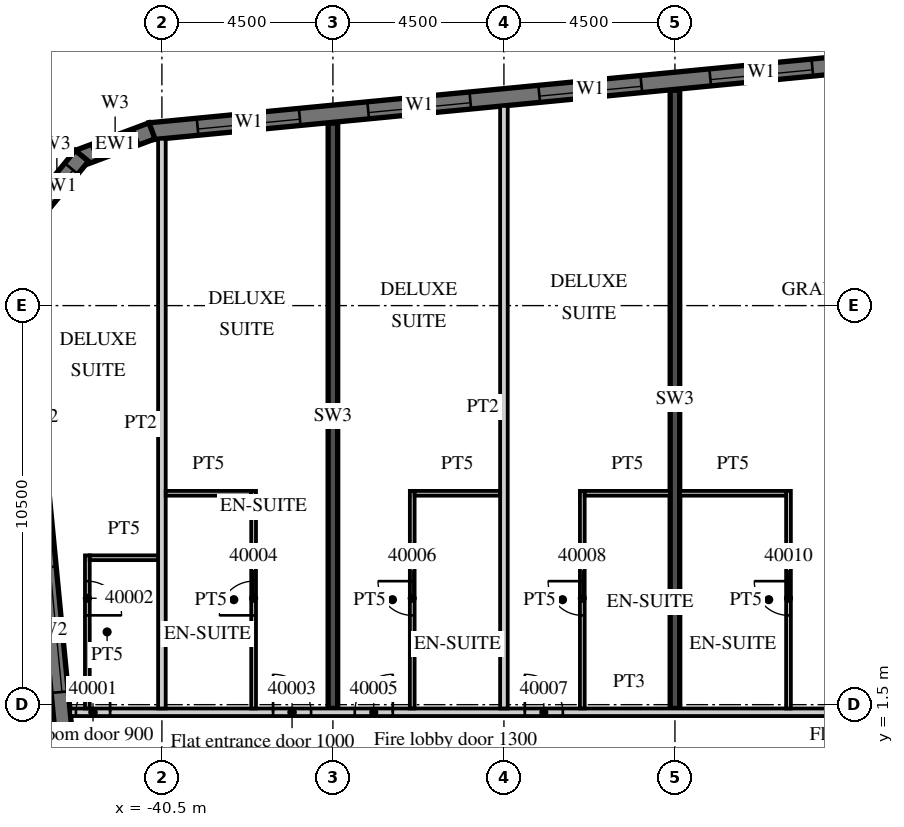
"""IFC4 building model, lengths in metres.
Left out: names, types, materials, properties, quantities, classifications, styles, units other than length and angle.
Written with IfcOpenShell. Run it as: python <this file> out.ifc"""

import sys

from ifc_helpers import new_model, si_unit, direction, frame, frame_2d, origin, place, context, subcontext, project, spatial, polyline, rectangle, outline, extrude, element, fill, save


model = new_model("IFC4")
c1 = context("Model", 3, precision=1e-05, world=origin(), true_north=direction((0.0, 1.0)))
c2 = subcontext(c1, "Body", "Model", "MODEL_VIEW")
j1 = project(units=[si_unit("LENGTHUNIT", "METRE"), si_unit("PLANEANGLEUNIT", "RADIAN")], contexts=[c1])
p1 = place(None, origin())
s1 = spatial("IfcSite", under=j1, at=p1, CompositionType="ELEMENT")
p2 = place(p1, origin())
s2 = spatial("IfcBuilding", under=s1, at=p2, CompositionType="ELEMENT")
p3 = place(p2, frame((0.0, 0.0, 173.5)))
s3 = spatial("IfcBuildingStorey", under=s2, at=p3, CompositionType="ELEMENT", Elevation=173.5)
p4 = place(p3, frame((-36.0, 1.4, 0.0), z_axis=(0.0, 0.0, 1.0), x_axis=(0.0, 1.0, 0.0)))
e1 = element("IfcWall", 1, at=p4, inside=s3, PredefinedType="SHEAR", context=c2, shape_type="SweptSolid", body=[
    extrude(rectangle(XDim=15.401, YDim=0.25, at=frame_2d((7.701, 0.0))), origin(), (0.0, 0.0, 1.0), 3.3),
])
p5 = place(p3, frame((-27.0, 1.4, 0.0), z_axis=(0.0, 0.0, 1.0), x_axis=(0.0, 1.0, 0.0)))
e2 = element("IfcWall", 2, at=p5, inside=s3, PredefinedType="SHEAR", context=c2, shape_type="SweptSolid", body=[
    extrude(rectangle(XDim=16.268, YDim=0.25, at=frame_2d((8.134, 0.0))), origin(), (0.0, 0.0, 1.0), 3.3),
])
p6 = place(p3, frame((-44.214, 12.466, 0.0), z_axis=(0.0, 0.0, 1.0), x_axis=(0.095847314626, -0.995396047952, 0.0)))
e3 = element("IfcWall", 3, at=p6, inside=s3, PredefinedType="SOLIDWALL", context=c2, shape_type="SweptSolid", body=[
    extrude(rectangle(XDim=34.0, YDim=0.45, at=frame_2d((17.0, 0.0))), origin(), (0.0, 0.0, 1.0), 3.02),
])
p7 = place(p6, frame((2.865, 0.0, 0.45)))
e4 = element("IfcOpeningElement", 4, at=p7, cuts=e3, PredefinedType="OPENING", context=c2, shape_type="SweptSolid", body=[
    extrude(rectangle(XDim=3.3, YDim=2.25, at=frame_2d((1.65, 1.125))), frame((0.0, 0.235, 0.0), z_axis=(0.0, -1.0, 0.0), x_axis=(1.0, 0.0, 0.0)), (0.0, 0.0, 1.0), 0.47),
])
p8 = place(p6, frame((7.386, 0.0, 0.45)))
e5 = element("IfcOpeningElement", 5, at=p8, cuts=e3, PredefinedType="OPENING", context=c2, shape_type="SweptSolid", body=[
    extrude(rectangle(XDim=3.3, YDim=2.25, at=frame_2d((1.65, 1.125))), frame((0.0, 0.235, 0.0), z_axis=(0.0, -1.0, 0.0), x_axis=(1.0, 0.0, 0.0)), (0.0, 0.0, 1.0), 0.47),
])
p9 = place(p3, frame((13.521, 21.817, 0.0), z_axis=(0.0, 0.0, 1.0), x_axis=(-0.995396508751, -0.095842529008, 0.0)))
e6 = element("IfcWall", 6, at=p9, inside=s3, PredefinedType="SOLIDWALL", context=c2, shape_type="SweptSolid", body=[
    extrude(rectangle(XDim=54.591, YDim=0.45, at=frame_2d((27.296, 0.0))), origin(), (0.0, 0.0, 1.0), 3.02),
])
p10 = place(p9, frame((0.91, 0.0, 0.45)))
e7 = element("IfcOpeningElement", 7, at=p10, cuts=e6, PredefinedType="OPENING", context=c2, shape_type="SweptSolid", body=[
    extrude(rectangle(XDim=2.7, YDim=2.25, at=frame_2d((1.35, 1.125))), frame((0.0, 0.235, 0.0), z_axis=(0.0, -1.0, 0.0), x_axis=(1.0, 0.0, 0.0)), (0.0, 0.0, 1.0), 0.47),
])
p11 = place(p9, frame((5.431, 0.0, 0.45)))
e8 = element("IfcOpeningElement", 8, at=p11, cuts=e6, PredefinedType="OPENING", context=c2, shape_type="SweptSolid", body=[
    extrude(rectangle(XDim=2.7, YDim=2.25, at=frame_2d((1.35, 1.125))), frame((0.0, 0.235, 0.0), z_axis=(0.0, -1.0, 0.0), x_axis=(1.0, 0.0, 0.0)), (0.0, 0.0, 1.0), 0.47),
])
p12 = place(p9, frame((9.952, 0.0, 0.45)))
e9 = element("IfcOpeningElement", 9, at=p12, cuts=e6, PredefinedType="OPENING", context=c2, shape_type="SweptSolid", body=[
    extrude(rectangle(XDim=2.7, YDim=2.25, at=frame_2d((1.35, 1.125))), frame((0.0, 0.235, 0.0), z_axis=(0.0, -1.0, 0.0), x_axis=(1.0, 0.0, 0.0)), (0.0, 0.0, 1.0), 0.47),
])
p13 = place(p9, frame((14.473, 0.0, 0.45)))
e10 = element("IfcOpeningElement", 10, at=p13, cuts=e6, PredefinedType="OPENING", context=c2, shape_type="SweptSolid", body=[
    extrude(rectangle(XDim=2.7, YDim=2.25, at=frame_2d((1.35, 1.125))), frame((0.0, 0.235, 0.0), z_axis=(0.0, -1.0, 0.0), x_axis=(1.0, 0.0, 0.0)), (0.0, 0.0, 1.0), 0.47),
])
p14 = place(p9, frame((18.994, 0.0, 0.45)))
e11 = element("IfcOpeningElement", 11, at=p14, cuts=e6, PredefinedType="OPENING", context=c2, shape_type="SweptSolid", body=[
    extrude(rectangle(XDim=2.7, YDim=2.25, at=frame_2d((1.35, 1.125))), frame((0.0, 0.235, 0.0), z_axis=(0.0, -1.0, 0.0), x_axis=(1.0, 0.0, 0.0)), (0.0, 0.0, 1.0), 0.47),
])
p15 = place(p9, frame((23.514, 0.0, 0.45)))
e12 = element("IfcOpeningElement", 12, at=p15, cuts=e6, PredefinedType="OPENING", context=c2, shape_type="SweptSolid", body=[
    extrude(rectangle(XDim=2.7, YDim=2.25, at=frame_2d((1.35, 1.125))), frame((0.0, 0.235, 0.0), z_axis=(0.0, -1.0, 0.0), x_axis=(1.0, 0.0, 0.0)), (0.0, 0.0, 1.0), 0.47),
])
p16 = place(p9, frame((28.035, 0.0, 0.45)))
e13 = element("IfcOpeningElement", 13, at=p16, cuts=e6, PredefinedType="OPENING", context=c2, shape_type="SweptSolid", body=[
    extrude(rectangle(XDim=2.7, YDim=2.25, at=frame_2d((1.35, 1.125))), frame((0.0, 0.235, 0.0), z_axis=(0.0, -1.0, 0.0), x_axis=(1.0, 0.0, 0.0)), (0.0, 0.0, 1.0), 0.47),
])
p17 = place(p9, frame((32.556, 0.0, 0.45)))
e14 = element("IfcOpeningElement", 14, at=p17, cuts=e6, PredefinedType="OPENING", context=c2, shape_type="SweptSolid", body=[
    extrude(rectangle(XDim=2.7, YDim=2.25, at=frame_2d((1.35, 1.125))), frame((0.0, 0.235, 0.0), z_axis=(0.0, -1.0, 0.0), x_axis=(1.0, 0.0, 0.0)), (0.0, 0.0, 1.0), 0.47),
])
p18 = place(p9, frame((37.077, 0.0, 0.45)))
e15 = element("IfcOpeningElement", 15, at=p18, cuts=e6, PredefinedType="OPENING", context=c2, shape_type="SweptSolid", body=[
    extrude(rectangle(XDim=2.7, YDim=2.25, at=frame_2d((1.35, 1.125))), frame((0.0, 0.235, 0.0), z_axis=(0.0, -1.0, 0.0), x_axis=(1.0, 0.0, 0.0)), (0.0, 0.0, 1.0), 0.47),
])
p19 = place(p9, frame((41.598, 0.0, 0.45)))
e16 = element("IfcOpeningElement", 16, at=p19, cuts=e6, PredefinedType="OPENING", context=c2, shape_type="SweptSolid", body=[
    extrude(rectangle(XDim=2.7, YDim=2.25, at=frame_2d((1.35, 1.125))), frame((0.0, 0.235, 0.0), z_axis=(0.0, -1.0, 0.0), x_axis=(1.0, 0.0, 0.0)), (0.0, 0.0, 1.0), 0.47),
])
p20 = place(p9, frame((46.118, 0.0, 0.45)))
e17 = element("IfcOpeningElement", 17, at=p20, cuts=e6, PredefinedType="OPENING", context=c2, shape_type="SweptSolid", body=[
    extrude(rectangle(XDim=2.7, YDim=2.25, at=frame_2d((1.35, 1.125))), frame((0.0, 0.235, 0.0), z_axis=(0.0, -1.0, 0.0), x_axis=(1.0, 0.0, 0.0)), (0.0, 0.0, 1.0), 0.47),
])
p21 = place(p9, frame((50.629, 0.0, 0.45)))
e18 = element("IfcOpeningElement", 18, at=p21, cuts=e6, PredefinedType="OPENING", context=c2, shape_type="SweptSolid", body=[
    extrude(rectangle(XDim=2.7, YDim=2.25, at=frame_2d((1.35, 1.125))), frame((0.0, 0.235, 0.0), z_axis=(0.0, -1.0, 0.0), x_axis=(1.0, 0.0, 0.0)), (0.0, 0.0, 1.0), 0.47),
])
p22 = place(p3, frame((-40.761, 16.598, 0.0), z_axis=(0.0, 0.0, 1.0), x_axis=(-0.936677599948, -0.350192909346, 0.0)))
e19 = element("IfcWall", 19, at=p22, inside=s3, PredefinedType="SOLIDWALL", context=c2, shape_type="SweptSolid", body=[
    extrude(outline(polyline([(0.0, -0.225), (2.071, -0.225), (1.95, 0.225), (0.121, 0.225), (0.0, -0.225)])), origin(), (0.0, 0.0, 1.0), 3.02),
])
p23 = place(p22, frame((0.435, 0.0, 0.45)))
e20 = element("IfcOpeningElement", 20, at=p23, cuts=e19, PredefinedType="OPENING", context=c2, shape_type="SweptSolid", body=[
    extrude(rectangle(XDim=1.2, YDim=2.25, at=frame_2d((0.6, 1.125))), frame((0.0, 0.235, 0.0), z_axis=(0.0, -1.0, 0.0), x_axis=(1.0, 0.0, 0.0)), (0.0, 0.0, 1.0), 0.47),
])
p24 = place(p3, frame((-42.606, 15.941, 0.0), z_axis=(0.0, 0.0, 1.0), x_axis=(-0.636116318187, -0.771593176315, 0.0)))
e21 = element("IfcWall", 21, at=p24, inside=s3, PredefinedType="SOLIDWALL", context=c2, shape_type="SweptSolid", body=[
    extrude(outline(polyline([(0.0, -0.225), (2.071, -0.225), (1.95, 0.225), (0.121, 0.225), (0.0, -0.225)])), origin(), (0.0, 0.0, 1.0), 3.02),
])
p25 = place(p24, frame((0.435, 0.0, 0.45)))
e22 = element("IfcOpeningElement", 22, at=p25, cuts=e21, PredefinedType="OPENING", context=c2, shape_type="SweptSolid", body=[
    extrude(rectangle(XDim=1.2, YDim=2.25, at=frame_2d((0.6, 1.125))), frame((0.0, 0.235, 0.0), z_axis=(0.0, -1.0, 0.0), x_axis=(1.0, 0.0, 0.0)), (0.0, 0.0, 1.0), 0.47),
])
p26 = place(p3, frame((-42.913, 1.3, 0.0), z_axis=(0.0, 0.0, 1.0), x_axis=(1.0, 0.0, 0.0)))
e23 = element("IfcWall", 23, at=p26, inside=s3, PredefinedType="PARTITIONING", context=c2, shape_type="SweptSolid", body=[
    extrude(rectangle(XDim=29.413, YDim=0.2, at=frame_2d((14.707, 0.0))), origin(), (0.0, 0.0, 1.0), 3.02),
])
p27 = place(p26, frame((0.15, 0.0, 0.0)))
e24 = element("IfcOpeningElement", 24, at=p27, cuts=e23, PredefinedType="OPENING", context=c2, shape_type="SweptSolid", body=[
    extrude(rectangle(XDim=0.9, YDim=2.1, at=frame_2d((0.45, 1.05))), frame((0.0, 0.11, 0.0), z_axis=(0.0, -1.0, 0.0), x_axis=(1.0, 0.0, 0.0)), (0.0, 0.0, 1.0), 0.22),
])
p28 = place(p26, frame((5.338, 0.0, 0.0)))
e25 = element("IfcOpeningElement", 25, at=p28, cuts=e23, PredefinedType="OPENING", context=c2, shape_type="SweptSolid", body=[
    extrude(rectangle(XDim=1.0, YDim=2.1, at=frame_2d((0.5, 1.05))), frame((0.0, 0.11, 0.0), z_axis=(0.0, -1.0, 0.0), x_axis=(1.0, 0.0, 0.0)), (0.0, 0.0, 1.0), 0.22),
])
p29 = place(p26, frame((7.488, 0.0, 0.0)))
e26 = element("IfcOpeningElement", 26, at=p29, cuts=e23, PredefinedType="OPENING", context=c2, shape_type="SweptSolid", body=[
    extrude(rectangle(XDim=1.0, YDim=2.1, at=frame_2d((0.5, 1.05))), frame((0.0, 0.11, 0.0), z_axis=(0.0, -1.0, 0.0), x_axis=(1.0, 0.0, 0.0)), (0.0, 0.0, 1.0), 0.22),
])
p30 = place(p26, frame((11.963, 0.0, 0.0)))
e27 = element("IfcOpeningElement", 27, at=p30, cuts=e23, PredefinedType="OPENING", context=c2, shape_type="SweptSolid", body=[
    extrude(rectangle(XDim=1.0, YDim=2.1, at=frame_2d((0.5, 1.05))), frame((0.0, 0.11, 0.0), z_axis=(0.0, -1.0, 0.0), x_axis=(1.0, 0.0, 0.0)), (0.0, 0.0, 1.0), 0.22),
])
p31 = place(p26, frame((21.275, 0.0, 0.0)))
e28 = element("IfcOpeningElement", 28, at=p31, cuts=e23, PredefinedType="OPENING", context=c2, shape_type="SweptSolid", body=[
    extrude(rectangle(XDim=1.2, YDim=2.1, at=frame_2d((0.6, 1.05))), frame((0.0, 0.11, 0.0), z_axis=(0.0, -1.0, 0.0), x_axis=(1.0, 0.0, 0.0)), (0.0, 0.0, 1.0), 0.22),
])
p32 = place(p26, frame((27.838, 0.0, 0.0)))
e29 = element("IfcOpeningElement", 29, at=p32, cuts=e23, PredefinedType="OPENING", context=c2, shape_type="SweptSolid", body=[
    extrude(rectangle(XDim=1.0, YDim=2.1, at=frame_2d((0.5, 1.05))), frame((0.0, 0.11, 0.0), z_axis=(0.0, -1.0, 0.0), x_axis=(1.0, 0.0, 0.0)), (0.0, 0.0, 1.0), 0.22),
])
p33 = place(p3, frame((-40.5, 1.4, 0.0), z_axis=(0.0, 0.0, 1.0), x_axis=(0.0, 1.0, 0.0)))
e30 = element("IfcWall", 30, at=p33, inside=s3, PredefinedType="PARTITIONING", context=c2, shape_type="SweptSolid", body=[
    extrude(rectangle(XDim=14.99, YDim=0.2, at=frame_2d((7.495, 0.0))), origin(), (0.0, 0.0, 1.0), 3.02),
])
p34 = place(p3, frame((-42.462, 1.4, 0.0), z_axis=(0.0, 0.0, 1.0), x_axis=(0.0, 1.0, 0.0)))
e31 = element("IfcWall", 31, at=p34, inside=s3, PredefinedType="PARTITIONING", context=c2, shape_type="SweptSolid", body=[
    extrude(rectangle(XDim=4.028, YDim=0.125, at=frame_2d((2.014, 0.0))), origin(), (0.0, 0.0, 1.0), 3.02),
])
p35 = place(p34, frame((2.45, 0.0, 0.0)))
e32 = element("IfcOpeningElement", 32, at=p35, cuts=e31, PredefinedType="OPENING", context=c2, shape_type="SweptSolid", body=[
    extrude(rectangle(XDim=0.9, YDim=2.1, at=frame_2d((0.45, 1.05))), frame((0.0, 0.073, 0.0), z_axis=(0.0, -1.0, 0.0), x_axis=(1.0, 0.0, 0.0)), (0.0, 0.0, 1.0), 0.145),
])
p36 = place(p3, frame((-42.4, 5.366, 0.0), z_axis=(0.0, 0.0, 1.0), x_axis=(1.0, 0.0, 0.0)))
e33 = element("IfcWall", 33, at=p36, inside=s3, PredefinedType="PARTITIONING", context=c2, shape_type="SweptSolid", body=[
    extrude(rectangle(XDim=1.8, YDim=0.125, at=frame_2d((0.9, 0.0))), origin(), (0.0, 0.0, 1.0), 3.02),
])
p37 = place(p3, frame((-38.087, 1.4, 0.0), z_axis=(0.0, 0.0, 1.0), x_axis=(0.0, 1.0, 0.0)))
e34 = element("IfcWall", 34, at=p37, inside=s3, PredefinedType="PARTITIONING", context=c2, shape_type="SweptSolid", body=[
    extrude(rectangle(XDim=5.725, YDim=0.125, at=frame_2d((2.863, 0.0))), origin(), (0.0, 0.0, 1.0), 3.02),
])
p38 = place(p37, frame((2.45, 0.0, 0.0)))
e35 = element("IfcOpeningElement", 35, at=p38, cuts=e34, PredefinedType="OPENING", context=c2, shape_type="SweptSolid", body=[
    extrude(rectangle(XDim=0.9, YDim=2.1, at=frame_2d((0.45, 1.05))), frame((0.0, 0.073, 0.0), z_axis=(0.0, -1.0, 0.0), x_axis=(1.0, 0.0, 0.0)), (0.0, 0.0, 1.0), 0.145),
])
p39 = place(p3, frame((-40.4, 7.062, 0.0), z_axis=(0.0, 0.0, 1.0), x_axis=(1.0, 0.0, 0.0)))
e36 = element("IfcWall", 36, at=p39, inside=s3, PredefinedType="PARTITIONING", context=c2, shape_type="SweptSolid", body=[
    extrude(rectangle(XDim=2.25, YDim=0.125, at=frame_2d((1.125, 0.0))), origin(), (0.0, 0.0, 1.0), 3.02),
])
p40 = place(p3, frame((-31.5, 1.4, 0.0), z_axis=(0.0, 0.0, 1.0), x_axis=(0.0, 1.0, 0.0)))
e37 = element("IfcWall", 37, at=p40, inside=s3, PredefinedType="PARTITIONING", context=c2, shape_type="SweptSolid", body=[
    extrude(rectangle(XDim=15.856, YDim=0.2, at=frame_2d((7.928, 0.0))), origin(), (0.0, 0.0, 1.0), 3.02),
])
p41 = place(p3, frame((-33.913, 1.4, 0.0), z_axis=(0.0, 0.0, 1.0), x_axis=(0.0, 1.0, 0.0)))
e38 = element("IfcWall", 38, at=p41, inside=s3, PredefinedType="PARTITIONING", context=c2, shape_type="SweptSolid", body=[
    extrude(rectangle(XDim=5.725, YDim=0.125, at=frame_2d((2.863, 0.0))), origin(), (0.0, 0.0, 1.0), 3.02),
])
p42 = place(p41, frame((2.45, 0.0, 0.0)))
e39 = element("IfcOpeningElement", 39, at=p42, cuts=e38, PredefinedType="OPENING", context=c2, shape_type="SweptSolid", body=[
    extrude(rectangle(XDim=0.9, YDim=2.1, at=frame_2d((0.45, 1.05))), frame((0.0, 0.073, 0.0), z_axis=(0.0, -1.0, 0.0), x_axis=(1.0, 0.0, 0.0)), (0.0, 0.0, 1.0), 0.145),
])
p43 = place(p3, frame((-33.85, 7.062, 0.0), z_axis=(0.0, 0.0, 1.0), x_axis=(1.0, 0.0, 0.0)))
e40 = element("IfcWall", 40, at=p43, inside=s3, PredefinedType="PARTITIONING", context=c2, shape_type="SweptSolid", body=[
    extrude(rectangle(XDim=2.25, YDim=0.125, at=frame_2d((1.125, 0.0))), origin(), (0.0, 0.0, 1.0), 3.02),
])
p44 = place(p3, frame((-29.438, 1.4, 0.0), z_axis=(0.0, 0.0, 1.0), x_axis=(0.0, 1.0, 0.0)))
e41 = element("IfcWall", 41, at=p44, inside=s3, PredefinedType="PARTITIONING", context=c2, shape_type="SweptSolid", body=[
    extrude(rectangle(XDim=5.725, YDim=0.125, at=frame_2d((2.863, 0.0))), origin(), (0.0, 0.0, 1.0), 3.02),
])
p45 = place(p44, frame((2.45, 0.0, 0.0)))
e42 = element("IfcOpeningElement", 42, at=p45, cuts=e41, PredefinedType="OPENING", context=c2, shape_type="SweptSolid", body=[
    extrude(rectangle(XDim=0.9, YDim=2.1, at=frame_2d((0.45, 1.05))), frame((0.0, 0.073, 0.0), z_axis=(0.0, -1.0, 0.0), x_axis=(1.0, 0.0, 0.0)), (0.0, 0.0, 1.0), 0.145),
])
p46 = place(p3, frame((-29.375, 7.062, 0.0), z_axis=(0.0, 0.0, 1.0), x_axis=(1.0, 0.0, 0.0)))
e43 = element("IfcWall", 43, at=p46, inside=s3, PredefinedType="PARTITIONING", context=c2, shape_type="SweptSolid", body=[
    extrude(rectangle(XDim=2.25, YDim=0.125, at=frame_2d((1.125, 0.0))), origin(), (0.0, 0.0, 1.0), 3.02),
])
p47 = place(p3, frame((-24.012, 1.4, 0.0), z_axis=(0.0, 0.0, 1.0), x_axis=(0.0, 1.0, 0.0)))
e44 = element("IfcWall", 44, at=p47, inside=s3, PredefinedType="PARTITIONING", context=c2, shape_type="SweptSolid", body=[
    extrude(rectangle(XDim=5.725, YDim=0.125, at=frame_2d((2.863, 0.0))), origin(), (0.0, 0.0, 1.0), 3.02),
])
p48 = place(p47, frame((2.45, 0.0, 0.0)))
e45 = element("IfcOpeningElement", 45, at=p48, cuts=e44, PredefinedType="OPENING", context=c2, shape_type="SweptSolid", body=[
    extrude(rectangle(XDim=0.9, YDim=2.1, at=frame_2d((0.45, 1.05))), frame((0.0, 0.073, 0.0), z_axis=(0.0, -1.0, 0.0), x_axis=(1.0, 0.0, 0.0)), (0.0, 0.0, 1.0), 0.145),
])
p49 = place(p3, frame((-26.875, 7.062, 0.0), z_axis=(0.0, 0.0, 1.0), x_axis=(1.0, 0.0, 0.0)))
e46 = element("IfcWall", 46, at=p49, inside=s3, PredefinedType="PARTITIONING", context=c2, shape_type="SweptSolid", body=[
    extrude(rectangle(XDim=2.8, YDim=0.125, at=frame_2d((1.4, 0.0))), origin(), (0.0, 0.0, 1.0), 3.02),
])
p50 = place(p8, origin())
e47 = element("IfcWindow", 47, at=p50, inside=s3, PartitioningType="SINGLE_PANEL", PredefinedType="WINDOW", context=c2, shape_type="SweptSolid", body=[
    extrude(rectangle(XDim=3.3, YDim=2.25, at=frame_2d((1.65, 1.125))), frame((0.0, 0.09, 0.0), z_axis=(0.0, -1.0, 0.0), x_axis=(1.0, 0.0, 0.0)), (0.0, 0.0, 1.0), 0.06),
])
fill(e5, e47)
p51 = place(p18, origin())
e48 = element("IfcWindow", 48, at=p51, inside=s3, PartitioningType="SINGLE_PANEL", PredefinedType="WINDOW", context=c2, shape_type="SweptSolid", body=[
    extrude(rectangle(XDim=2.7, YDim=2.25, at=frame_2d((1.35, 1.125))), frame((0.0, 0.09, 0.0), z_axis=(0.0, -1.0, 0.0), x_axis=(1.0, 0.0, 0.0)), (0.0, 0.0, 1.0), 0.06),
])
fill(e15, e48)
p52 = place(p19, origin())
e49 = element("IfcWindow", 49, at=p52, inside=s3, PartitioningType="SINGLE_PANEL", PredefinedType="WINDOW", context=c2, shape_type="SweptSolid", body=[
    extrude(rectangle(XDim=2.7, YDim=2.25, at=frame_2d((1.35, 1.125))), frame((0.0, 0.09, 0.0), z_axis=(0.0, -1.0, 0.0), x_axis=(1.0, 0.0, 0.0)), (0.0, 0.0, 1.0), 0.06),
])
fill(e16, e49)
p53 = place(p20, origin())
e50 = element("IfcWindow", 50, at=p53, inside=s3, PartitioningType="SINGLE_PANEL", PredefinedType="WINDOW", context=c2, shape_type="SweptSolid", body=[
    extrude(rectangle(XDim=2.7, YDim=2.25, at=frame_2d((1.35, 1.125))), frame((0.0, 0.09, 0.0), z_axis=(0.0, -1.0, 0.0), x_axis=(1.0, 0.0, 0.0)), (0.0, 0.0, 1.0), 0.06),
])
fill(e17, e50)
p54 = place(p21, origin())
e51 = element("IfcWindow", 51, at=p54, inside=s3, PartitioningType="SINGLE_PANEL", PredefinedType="WINDOW", context=c2, shape_type="SweptSolid", body=[
    extrude(rectangle(XDim=2.7, YDim=2.25, at=frame_2d((1.35, 1.125))), frame((0.0, 0.09, 0.0), z_axis=(0.0, -1.0, 0.0), x_axis=(1.0, 0.0, 0.0)), (0.0, 0.0, 1.0), 0.06),
])
fill(e18, e51)
p55 = place(p23, origin())
e52 = element("IfcWindow", 52, at=p55, inside=s3, PartitioningType="SINGLE_PANEL", PredefinedType="WINDOW", context=c2, shape_type="SweptSolid", body=[
    extrude(rectangle(XDim=1.2, YDim=2.25, at=frame_2d((0.6, 1.125))), frame((0.0, 0.09, 0.0), z_axis=(0.0, -1.0, 0.0), x_axis=(1.0, 0.0, 0.0)), (0.0, 0.0, 1.0), 0.06),
])
fill(e20, e52)
p56 = place(p25, origin())
e53 = element("IfcWindow", 53, at=p56, inside=s3, PartitioningType="SINGLE_PANEL", PredefinedType="WINDOW", context=c2, shape_type="SweptSolid", body=[
    extrude(rectangle(XDim=1.2, YDim=2.25, at=frame_2d((0.6, 1.125))), frame((0.0, 0.09, 0.0), z_axis=(0.0, -1.0, 0.0), x_axis=(1.0, 0.0, 0.0)), (0.0, 0.0, 1.0), 0.06),
])
fill(e22, e53)
p57 = place(p27, origin())
e54 = element("IfcDoor", 54, at=p57, inside=s3, OperationType="SINGLE_SWING_RIGHT", PredefinedType="DOOR", context=c2, shape_type="SweptSolid", body=[
    extrude(rectangle(XDim=0.9, YDim=2.1, at=frame_2d((0.45, 1.05))), frame((0.0, 0.025, 0.0), z_axis=(0.0, -1.0, 0.0), x_axis=(1.0, 0.0, 0.0)), (0.0, 0.0, 1.0), 0.05),
])
fill(e24, e54)
p58 = place(p35, origin())
e55 = element("IfcDoor", 55, at=p58, inside=s3, OperationType="SINGLE_SWING_LEFT", PredefinedType="DOOR", context=c2, shape_type="SweptSolid", body=[
    extrude(rectangle(XDim=0.9, YDim=2.1, at=frame_2d((0.45, 1.05))), frame((0.0, 0.025, 0.0), z_axis=(0.0, -1.0, 0.0), x_axis=(1.0, 0.0, 0.0)), (0.0, 0.0, 1.0), 0.05),
])
fill(e32, e55)
p59 = place(p28, origin())
e56 = element("IfcDoor", 56, at=p59, inside=s3, OperationType="SINGLE_SWING_LEFT", PredefinedType="DOOR", context=c2, shape_type="SweptSolid", body=[
    extrude(rectangle(XDim=1.0, YDim=2.1, at=frame_2d((0.5, 1.05))), frame((0.0, 0.025, 0.0), z_axis=(0.0, -1.0, 0.0), x_axis=(1.0, 0.0, 0.0)), (0.0, 0.0, 1.0), 0.05),
])
fill(e25, e56)
p60 = place(p38, origin())
e57 = element("IfcDoor", 57, at=p60, inside=s3, OperationType="SINGLE_SWING_LEFT", PredefinedType="DOOR", context=c2, shape_type="SweptSolid", body=[
    extrude(rectangle(XDim=0.9, YDim=2.1, at=frame_2d((0.45, 1.05))), frame((0.0, 0.025, 0.0), z_axis=(0.0, -1.0, 0.0), x_axis=(1.0, 0.0, 0.0)), (0.0, 0.0, 1.0), 0.05),
])
fill(e35, e57)
p61 = place(p29, origin())
e58 = element("IfcDoor", 58, at=p61, inside=s3, OperationType="SINGLE_SWING_RIGHT", PredefinedType="DOOR", context=c2, shape_type="SweptSolid", body=[
    extrude(rectangle(XDim=1.0, YDim=2.1, at=frame_2d((0.5, 1.05))), frame((0.0, 0.025, 0.0), z_axis=(0.0, -1.0, 0.0), x_axis=(1.0, 0.0, 0.0)), (0.0, 0.0, 1.0), 0.05),
])
fill(e26, e58)
p62 = place(p42, origin())
e59 = element("IfcDoor", 59, at=p62, inside=s3, OperationType="SINGLE_SWING_RIGHT", PredefinedType="DOOR", context=c2, shape_type="SweptSolid", body=[
    extrude(rectangle(XDim=0.9, YDim=2.1, at=frame_2d((0.45, 1.05))), frame((0.0, 0.025, 0.0), z_axis=(0.0, -1.0, 0.0), x_axis=(1.0, 0.0, 0.0)), (0.0, 0.0, 1.0), 0.05),
])
fill(e39, e59)
p63 = place(p30, origin())
e60 = element("IfcDoor", 60, at=p63, inside=s3, OperationType="SINGLE_SWING_LEFT", PredefinedType="DOOR", context=c2, shape_type="SweptSolid", body=[
    extrude(rectangle(XDim=1.0, YDim=2.1, at=frame_2d((0.5, 1.05))), frame((0.0, 0.025, 0.0), z_axis=(0.0, -1.0, 0.0), x_axis=(1.0, 0.0, 0.0)), (0.0, 0.0, 1.0), 0.05),
])
fill(e27, e60)
p64 = place(p45, origin())
e61 = element("IfcDoor", 61, at=p64, inside=s3, OperationType="SINGLE_SWING_RIGHT", PredefinedType="DOOR", context=c2, shape_type="SweptSolid", body=[
    extrude(rectangle(XDim=0.9, YDim=2.1, at=frame_2d((0.45, 1.05))), frame((0.0, 0.025, 0.0), z_axis=(0.0, -1.0, 0.0), x_axis=(1.0, 0.0, 0.0)), (0.0, 0.0, 1.0), 0.05),
])
fill(e42, e61)
p65 = place(p48, origin())
e62 = element("IfcDoor", 62, at=p65, inside=s3, OperationType="SINGLE_SWING_RIGHT", PredefinedType="DOOR", context=c2, shape_type="SweptSolid", body=[
    extrude(rectangle(XDim=0.9, YDim=2.1, at=frame_2d((0.45, 1.05))), frame((0.0, 0.025, 0.0), z_axis=(0.0, -1.0, 0.0), x_axis=(1.0, 0.0, 0.0)), (0.0, 0.0, 1.0), 0.05),
])
fill(e45, e62)
save(model, sys.argv[1])
